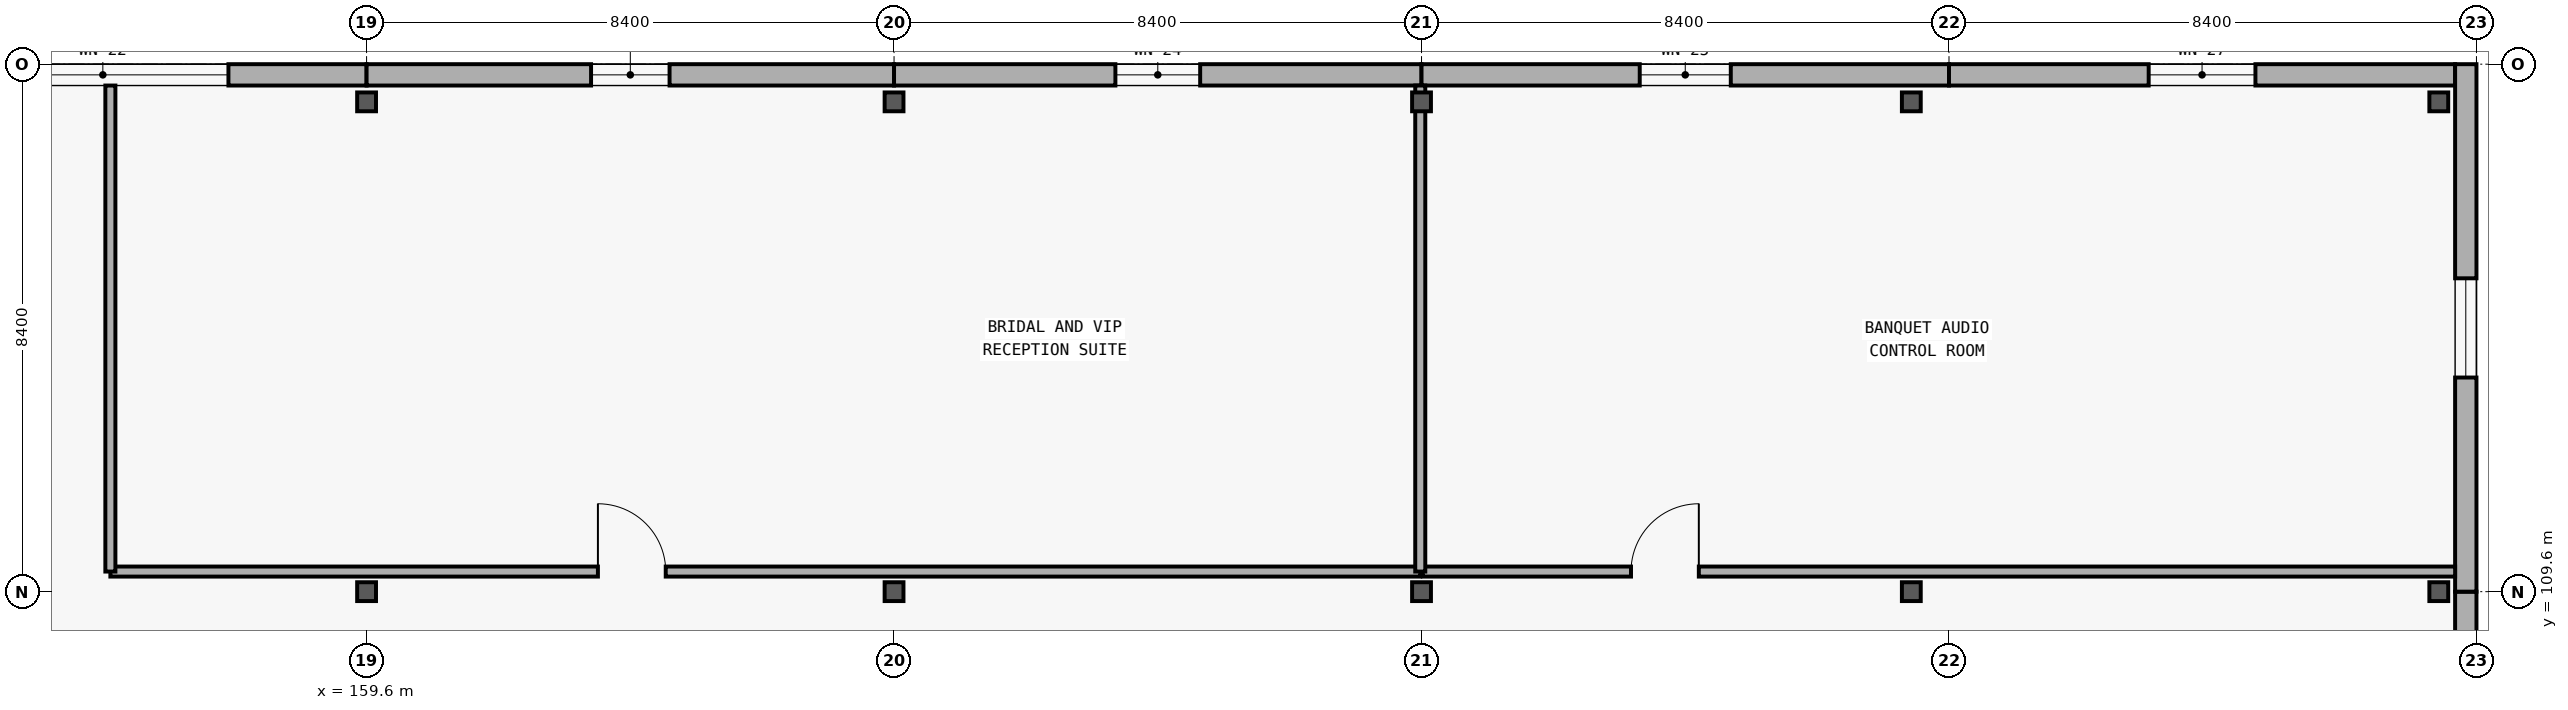
"""IFC4 building model, lengths in metres.
Left out: names, types, materials, properties, quantities, classifications, styles, units other than length and angle.
Written with IfcOpenShell. Run it as: python <this file> out.ifc"""

import sys

from ifc_helpers import new_model, si_unit, direction, frame, frame_2d, origin, origin_2d, place, context, subcontext, project, spatial, rectangle, i_section, extrude, element, fill, save


model = new_model("IFC4")
c1 = context("Model", 3, precision=1e-05, world=origin(), true_north=direction((0.0, 1.0)))
c2 = subcontext(c1, "Body", "Model", "MODEL_VIEW")
j1 = project(units=[si_unit("LENGTHUNIT", "METRE"), si_unit("PLANEANGLEUNIT", "RADIAN")], contexts=[c1])
p1 = place(None, origin())
s1 = spatial("IfcSite", under=j1, at=p1, CompositionType="ELEMENT")
p2 = place(p1, origin())
s2 = spatial("IfcBuilding", under=s1, at=p2, CompositionType="ELEMENT")
p3 = place(p2, frame((0.0, 0.0, 5.4)))
s3 = spatial("IfcBuildingStorey", under=s2, at=p3, CompositionType="ELEMENT", Elevation=5.4)
for number, where, z_axis, x_axis in (
    (1, (159.6, 109.6, 0.0), (0.0, 0.0, 1.0), (1.0, 0.0, 0.0)),
    (2, (159.6, 117.4, 0.0), (0.0, 0.0, 1.0), (1.0, 0.0, 0.0)),
    (3, (168.0, 109.6, 0.0), (0.0, 0.0, 1.0), (1.0, 0.0, 0.0)),
    (4, (168.0, 117.4, 0.0), (0.0, 0.0, 1.0), (1.0, 0.0, 0.0)),
    (5, (176.4, 109.6, 0.0), (0.0, 0.0, 1.0), (1.0, 0.0, 0.0)),
    (6, (176.4, 117.4, 0.0), (0.0, 0.0, 1.0), (1.0, 0.0, 0.0)),
    (7, (184.2, 109.6, 0.0), (0.0, 0.0, 1.0), (1.0, 0.0, 0.0)),
    (8, (184.2, 117.4, 0.0), (0.0, 0.0, 1.0), (1.0, 0.0, 0.0)),
    (9, (192.6, 109.6, 0.0), (0.0, 0.0, 1.0), (1.0, 0.0, 0.0)),
    (10, (192.6, 117.4, 0.0), (0.0, 0.0, 1.0), (1.0, 0.0, 0.0)),
):
    element("IfcColumn", number, at=place(p3, frame(where, z_axis=z_axis, x_axis=x_axis)), inside=s3, PredefinedType="COLUMN", context=c2, shape_type="SweptSolid", body=[
        extrude(i_section(OverallWidth=0.3, OverallDepth=0.3, WebThickness=0.011, FlangeThickness=0.019, at=origin_2d()), origin(), (0.0, 0.0, 1.0), 5.4),
    ])
p4 = place(p3, frame((151.2, 117.83, 0.0), z_axis=(0.0, 0.0, 1.0), x_axis=(1.0, 0.0, 0.0)))
e11 = element("IfcWall", 11, at=p4, inside=s3, PredefinedType="SOLIDWALL", context=c2, shape_type="SweptSolid", body=[
    extrude(rectangle(XDim=8.4, YDim=0.34, at=frame_2d((4.2, 0.0))), origin(), (0.0, 0.0, 1.0), 5.08),
])
p5 = place(p4, frame((2.2, 0.0, 0.9)))
e12 = element("IfcOpeningElement", 12, at=p5, cuts=e11, PredefinedType="OPENING", context=c2, shape_type="SweptSolid", body=[
    extrude(rectangle(XDim=4.0, YDim=2.4, at=frame_2d((2.0, 1.2))), frame((0.0, 0.18, 0.0), z_axis=(0.0, -1.0, 0.0), x_axis=(1.0, 0.0, 0.0)), (0.0, 0.0, 1.0), 0.36),
])
p6 = place(p3, frame((159.6, 117.83, 0.0), z_axis=(0.0, 0.0, 1.0), x_axis=(1.0, 0.0, 0.0)))
e13 = element("IfcWall", 13, at=p6, inside=s3, PredefinedType="SOLIDWALL", context=c2, shape_type="SweptSolid", body=[
    extrude(rectangle(XDim=8.4, YDim=0.34, at=frame_2d((4.2, 0.0))), origin(), (0.0, 0.0, 1.0), 5.08),
])
p7 = place(p6, frame((3.575, 0.0, 0.9)))
e14 = element("IfcOpeningElement", 14, at=p7, cuts=e13, PredefinedType="OPENING", context=c2, shape_type="SweptSolid", body=[
    extrude(rectangle(XDim=1.25, YDim=1.45, at=frame_2d((0.625, 0.725))), frame((0.0, 0.18, 0.0), z_axis=(0.0, -1.0, 0.0), x_axis=(1.0, 0.0, 0.0)), (0.0, 0.0, 1.0), 0.36),
])
p8 = place(p3, frame((168.0, 117.83, 0.0), z_axis=(0.0, 0.0, 1.0), x_axis=(1.0, 0.0, 0.0)))
e15 = element("IfcWall", 15, at=p8, inside=s3, PredefinedType="SOLIDWALL", context=c2, shape_type="SweptSolid", body=[
    extrude(rectangle(XDim=8.4, YDim=0.34, at=frame_2d((4.2, 0.0))), origin(), (0.0, 0.0, 1.0), 5.08),
])
p9 = place(p8, frame((3.525, 0.0, 0.9)))
e16 = element("IfcOpeningElement", 16, at=p9, cuts=e15, PredefinedType="OPENING", context=c2, shape_type="SweptSolid", body=[
    extrude(rectangle(XDim=1.35, YDim=1.55, at=frame_2d((0.675, 0.775))), frame((0.0, 0.18, 0.0), z_axis=(0.0, -1.0, 0.0), x_axis=(1.0, 0.0, 0.0)), (0.0, 0.0, 1.0), 0.36),
])
p10 = place(p3, frame((176.4, 117.83, 0.0), z_axis=(0.0, 0.0, 1.0), x_axis=(1.0, 0.0, 0.0)))
e17 = element("IfcWall", 17, at=p10, inside=s3, PredefinedType="SOLIDWALL", context=c2, shape_type="SweptSolid", body=[
    extrude(rectangle(XDim=8.4, YDim=0.34, at=frame_2d((4.2, 0.0))), origin(), (0.0, 0.0, 1.0), 5.08),
])
p11 = place(p10, frame((3.475, 0.0, 0.9)))
e18 = element("IfcOpeningElement", 18, at=p11, cuts=e17, PredefinedType="OPENING", context=c2, shape_type="SweptSolid", body=[
    extrude(rectangle(XDim=1.45, YDim=1.65, at=frame_2d((0.725, 0.825))), frame((0.0, 0.18, 0.0), z_axis=(0.0, -1.0, 0.0), x_axis=(1.0, 0.0, 0.0)), (0.0, 0.0, 1.0), 0.36),
])
p12 = place(p3, frame((184.8, 117.83, 0.0), z_axis=(0.0, 0.0, 1.0), x_axis=(1.0, 0.0, 0.0)))
e19 = element("IfcWall", 19, at=p12, inside=s3, PredefinedType="SOLIDWALL", context=c2, shape_type="SweptSolid", body=[
    extrude(rectangle(XDim=8.06, YDim=0.34, at=frame_2d((4.03, 0.0))), origin(), (0.0, 0.0, 1.0), 5.08),
])
p13 = place(p12, frame((3.18, 0.0, 0.9)))
e20 = element("IfcOpeningElement", 20, at=p13, cuts=e19, PredefinedType="OPENING", context=c2, shape_type="SweptSolid", body=[
    extrude(rectangle(XDim=1.7, YDim=2.0, at=frame_2d((0.85, 1.0))), frame((0.0, 0.18, 0.0), z_axis=(0.0, -1.0, 0.0), x_axis=(1.0, 0.0, 0.0)), (0.0, 0.0, 1.0), 0.36),
])
p14 = place(p3, frame((193.03, 109.6, 0.0), z_axis=(0.0, 0.0, 1.0), x_axis=(0.0, -1.0, 0.0)))
e21 = element("IfcWall", 21, at=p14, inside=s3, PredefinedType="SOLIDWALL", context=c2, shape_type="SweptSolid", body=[
    extrude(rectangle(XDim=8.4, YDim=0.34, at=frame_2d((4.2, 0.0))), origin(), (0.0, 0.0, 1.0), 5.08),
])
p15 = place(p14, frame((3.51, 0.0, 0.9)))
e22 = element("IfcOpeningElement", 22, at=p15, cuts=e21, PredefinedType="OPENING", context=c2, shape_type="SweptSolid", body=[
    extrude(rectangle(XDim=1.38, YDim=1.7, at=frame_2d((0.69, 0.85))), frame((0.0, 0.18, 0.0), z_axis=(0.0, -1.0, 0.0), x_axis=(1.0, 0.0, 0.0)), (0.0, 0.0, 1.0), 0.36),
])
p16 = place(p3, frame((193.03, 118.0, 0.0), z_axis=(0.0, 0.0, 1.0), x_axis=(0.0, -1.0, 0.0)))
e23 = element("IfcWall", 23, at=p16, inside=s3, PredefinedType="SOLIDWALL", context=c2, shape_type="SweptSolid", body=[
    extrude(rectangle(XDim=8.4, YDim=0.34, at=frame_2d((4.2, 0.0))), origin(), (0.0, 0.0, 1.0), 5.08),
])
p17 = place(p16, frame((3.41, 0.0, 0.9)))
e24 = element("IfcOpeningElement", 24, at=p17, cuts=e23, PredefinedType="OPENING", context=c2, shape_type="SweptSolid", body=[
    extrude(rectangle(XDim=1.58, YDim=1.85, at=frame_2d((0.79, 0.925))), frame((0.0, 0.18, 0.0), z_axis=(0.0, -1.0, 0.0), x_axis=(1.0, 0.0, 0.0)), (0.0, 0.0, 1.0), 0.36),
])
p18 = place(p3, frame((155.52, 109.92, 0.0), z_axis=(0.0, 0.0, 1.0), x_axis=(1.0, 0.0, 0.0)))
e25 = element("IfcWall", 25, at=p18, inside=s3, PredefinedType="PARTITIONING", context=c2, shape_type="SweptSolid", body=[
    extrude(rectangle(XDim=20.86, YDim=0.16, at=frame_2d((10.43, 0.0))), origin(), (0.0, 0.0, 1.0), 4.18),
])
p19 = place(p18, frame((7.764, 0.0, 0.0)))
e26 = element("IfcOpeningElement", 26, at=p19, cuts=e25, PredefinedType="OPENING", context=c2, shape_type="SweptSolid", body=[
    extrude(rectangle(XDim=1.08, YDim=2.25, at=frame_2d((0.54, 1.125))), frame((0.0, 0.09, 0.0), z_axis=(0.0, -1.0, 0.0), x_axis=(1.0, 0.0, 0.0)), (0.0, 0.0, 1.0), 0.18),
])
p20 = place(p3, frame((176.42, 109.92, 0.0), z_axis=(0.0, 0.0, 1.0), x_axis=(1.0, 0.0, 0.0)))
e27 = element("IfcWall", 27, at=p20, inside=s3, PredefinedType="PARTITIONING", context=c2, shape_type="SweptSolid", body=[
    extrude(rectangle(XDim=16.44, YDim=0.16, at=frame_2d((8.22, 0.0))), origin(), (0.0, 0.0, 1.0), 4.18),
])
p21 = place(p20, frame((3.316, 0.0, 0.0)))
e28 = element("IfcOpeningElement", 28, at=p21, cuts=e27, PredefinedType="OPENING", context=c2, shape_type="SweptSolid", body=[
    extrude(rectangle(XDim=1.08, YDim=2.25, at=frame_2d((0.54, 1.125))), frame((0.0, 0.09, 0.0), z_axis=(0.0, -1.0, 0.0), x_axis=(1.0, 0.0, 0.0)), (0.0, 0.0, 1.0), 0.18),
])
for number, where, z_axis, x_axis in (
    (29, (155.52, 109.92, 0.0), (0.0, 0.0, 1.0), (0.0, 1.0, 0.0)),
    (30, (176.38, 109.92, 0.0), (0.0, 0.0, 1.0), (0.0, 1.0, 0.0)),
):
    element("IfcWall", number, at=place(p3, frame(where, z_axis=z_axis, x_axis=x_axis)), inside=s3, PredefinedType="PARTITIONING", context=c2, shape_type="SweptSolid", body=[
        extrude(rectangle(XDim=7.74, YDim=0.16, at=frame_2d((3.87, 0.0))), origin(), (0.0, 0.0, 1.0), 4.18),
    ])
p22 = place(p5, origin())
e31 = element("IfcWindow", 31, at=p22, inside=s3, PartitioningType="SINGLE_PANEL", PredefinedType="WINDOW", context=c2, shape_type="SweptSolid", body=[
    extrude(rectangle(XDim=4.0, YDim=2.4, at=frame_2d((2.0, 1.2))), frame((0.0, 0.03, 0.0), z_axis=(0.0, -1.0, 0.0), x_axis=(1.0, 0.0, 0.0)), (0.0, 0.0, 1.0), 0.06),
])
fill(e12, e31)
p23 = place(p7, origin())
e32 = element("IfcWindow", 32, at=p23, inside=s3, PartitioningType="SINGLE_PANEL", PredefinedType="WINDOW", context=c2, shape_type="SweptSolid", body=[
    extrude(rectangle(XDim=1.25, YDim=1.45, at=frame_2d((0.625, 0.725))), frame((0.0, 0.03, 0.0), z_axis=(0.0, -1.0, 0.0), x_axis=(1.0, 0.0, 0.0)), (0.0, 0.0, 1.0), 0.06),
])
fill(e14, e32)
p24 = place(p9, origin())
e33 = element("IfcWindow", 33, at=p24, inside=s3, PartitioningType="SINGLE_PANEL", PredefinedType="WINDOW", context=c2, shape_type="SweptSolid", body=[
    extrude(rectangle(XDim=1.35, YDim=1.55, at=frame_2d((0.675, 0.775))), frame((0.0, 0.03, 0.0), z_axis=(0.0, -1.0, 0.0), x_axis=(1.0, 0.0, 0.0)), (0.0, 0.0, 1.0), 0.06),
])
fill(e16, e33)
p25 = place(p11, origin())
e34 = element("IfcWindow", 34, at=p25, inside=s3, PartitioningType="SINGLE_PANEL", PredefinedType="WINDOW", context=c2, shape_type="SweptSolid", body=[
    extrude(rectangle(XDim=1.45, YDim=1.65, at=frame_2d((0.725, 0.825))), frame((0.0, 0.03, 0.0), z_axis=(0.0, -1.0, 0.0), x_axis=(1.0, 0.0, 0.0)), (0.0, 0.0, 1.0), 0.06),
])
fill(e18, e34)
p26 = place(p13, origin())
e35 = element("IfcWindow", 35, at=p26, inside=s3, PartitioningType="SINGLE_PANEL", PredefinedType="WINDOW", context=c2, shape_type="SweptSolid", body=[
    extrude(rectangle(XDim=1.7, YDim=2.0, at=frame_2d((0.85, 1.0))), frame((0.0, 0.03, 0.0), z_axis=(0.0, -1.0, 0.0), x_axis=(1.0, 0.0, 0.0)), (0.0, 0.0, 1.0), 0.06),
])
fill(e20, e35)
p27 = place(p17, origin())
e36 = element("IfcWindow", 36, at=p27, inside=s3, PartitioningType="SINGLE_PANEL", PredefinedType="WINDOW", context=c2, shape_type="SweptSolid", body=[
    extrude(rectangle(XDim=1.58, YDim=1.85, at=frame_2d((0.79, 0.925))), frame((0.0, 0.03, 0.0), z_axis=(0.0, -1.0, 0.0), x_axis=(1.0, 0.0, 0.0)), (0.0, 0.0, 1.0), 0.06),
])
fill(e24, e36)
p28 = place(p19, origin())
e37 = element("IfcDoor", 37, at=p28, inside=s3, OperationType="SINGLE_SWING_LEFT", PredefinedType="DOOR", context=c2, shape_type="SweptSolid", body=[
    extrude(rectangle(XDim=1.08, YDim=2.25, at=frame_2d((0.54, 1.125))), frame((0.0, 0.025, 0.0), z_axis=(0.0, -1.0, 0.0), x_axis=(1.0, 0.0, 0.0)), (0.0, 0.0, 1.0), 0.05),
])
fill(e26, e37)
p29 = place(p21, origin())
e38 = element("IfcDoor", 38, at=p29, inside=s3, OperationType="SINGLE_SWING_RIGHT", PredefinedType="DOOR", context=c2, shape_type="SweptSolid", body=[
    extrude(rectangle(XDim=1.08, YDim=2.25, at=frame_2d((0.54, 1.125))), frame((0.0, 0.025, 0.0), z_axis=(0.0, -1.0, 0.0), x_axis=(1.0, 0.0, 0.0)), (0.0, 0.0, 1.0), 0.05),
])
fill(e28, e38)
save(model, sys.argv[1])
